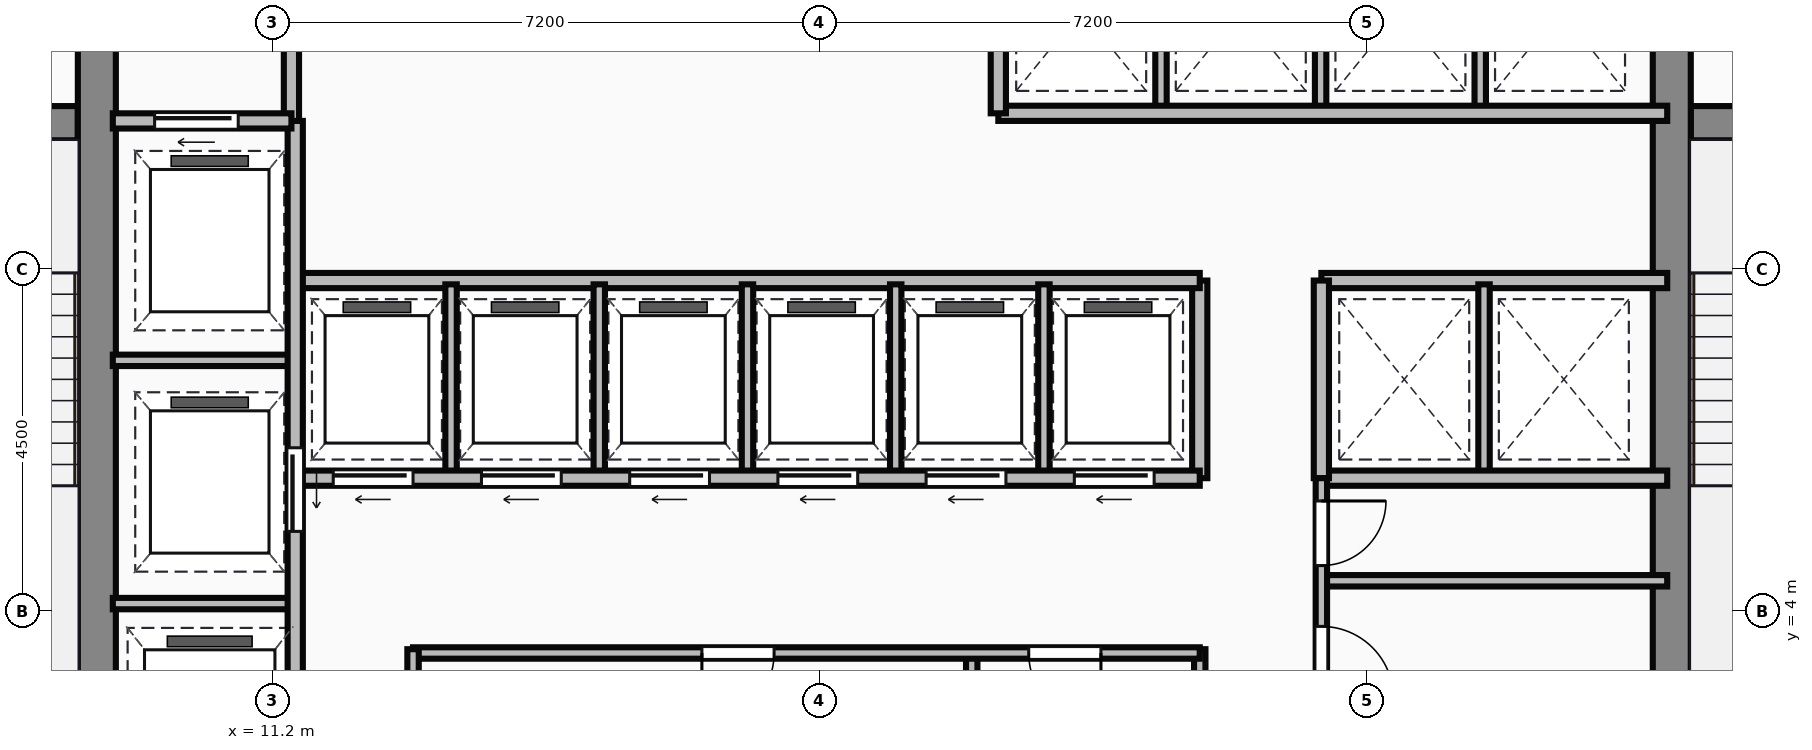
"""IFC4 building model, lengths in metres.
Left out: names, types, materials, properties, quantities, classifications, styles, units other than length and angle.
Written with IfcOpenShell. Run it as: python <this file> out.ifc"""

import sys

from ifc_helpers import new_model, si_unit, direction, frame, frame_2d, origin, place, context, subcontext, project, spatial, rectangle, extrude, source, transform, mapped, element, fill, save


model = new_model("IFC4")
c1 = context("Model", 3, precision=1e-05, world=origin(), true_north=direction((0.0, 1.0)))
c2 = subcontext(c1, "Body", "Model", "MODEL_VIEW")
j1 = project(units=[si_unit("LENGTHUNIT", "METRE"), si_unit("PLANEANGLEUNIT", "RADIAN")], contexts=[c1])
p1 = place(None, origin())
s1 = spatial("IfcSite", under=j1, at=p1, CompositionType="ELEMENT")
p2 = place(p1, origin())
s2 = spatial("IfcBuilding", under=s1, at=p2, CompositionType="ELEMENT")
p3 = place(p2, frame((0.0, 0.0, 92.3)))
s3 = spatial("IfcBuildingStorey", under=s2, at=p3, CompositionType="ELEMENT", Elevation=92.3)
m1 = source(origin(), c2, "Body", "SweptSolid", [
    extrude(rectangle(XDim=12.35, YDim=0.5, at=frame_2d((6.175, 0.0))), origin(), (0.0, 0.0, 1.0), 3.65),
])
for number, where, z_axis, x_axis in (
    (1, (8.89, 0.9, 0.0), (0.0, 0.0, 1.0), (0.0, 1.0, 0.0)),
    (2, (29.61, 0.9, 0.0), (0.0, 0.0, 1.0), (0.0, 1.0, 0.0)),
):
    element("IfcWall", number, at=place(p3, frame(where, z_axis=z_axis, x_axis=x_axis)), inside=s3, PredefinedType="SHEAR", context=c2, shape_type="MappedRepresentation", body=[
        mapped(m1, transform((0.0, 0.0, 0.0))),
    ])
m2 = source(origin(), c2, "Body", "SweptSolid", [
    extrude(rectangle(XDim=3.39, YDim=0.45, at=frame_2d((1.695, 0.0))), origin(), (0.0, 0.0, 1.0), 3.65),
])
p4 = place(p3, frame((5.25, 10.42, 0.0), z_axis=(0.0, 0.0, 1.0), x_axis=(1.0, 0.0, 0.0)))
e3 = element("IfcWall", 3, at=p4, inside=s3, PredefinedType="SHEAR", context=c2, shape_type="MappedRepresentation", body=[
    mapped(m2, transform((0.0, 0.0, 0.0))),
])
p5 = place(p4, frame((1.05, 0.0, 0.0)))
e4 = element("IfcOpeningElement", 4, at=p5, cuts=e3, PredefinedType="OPENING", context=c2, shape_type="SweptSolid", body=[
    extrude(rectangle(XDim=1.1, YDim=2.15, at=frame_2d((0.55, 1.075))), frame((0.0, 0.235, 0.0), z_axis=(0.0, -1.0, 0.0), x_axis=(1.0, 0.0, 0.0)), (0.0, 0.0, 1.0), 0.47),
])
p6 = place(p3, frame((29.86, 10.42, 0.0), z_axis=(0.0, 0.0, 1.0), x_axis=(1.0, 0.0, 0.0)))
e5 = element("IfcWall", 5, at=p6, inside=s3, PredefinedType="SHEAR", context=c2, shape_type="MappedRepresentation", body=[
    mapped(m2, transform((0.0, 0.0, 0.0))),
])
p7 = place(p6, frame((1.1, 0.0, 0.0)))
e6 = element("IfcOpeningElement", 6, at=p7, cuts=e5, PredefinedType="OPENING", context=c2, shape_type="SweptSolid", body=[
    extrude(rectangle(XDim=1.1, YDim=2.15, at=frame_2d((0.55, 1.075))), frame((0.0, 0.235, 0.0), z_axis=(0.0, -1.0, 0.0), x_axis=(1.0, 0.0, 0.0)), (0.0, 0.0, 1.0), 0.47),
])
m3 = source(origin(), c2, "Body", "SweptSolid", [
    extrude(rectangle(XDim=3.18, YDim=0.2, at=frame_2d((1.59, 0.0))), origin(), (0.0, 0.0, 1.0), 3.4),
])
p8 = place(p3, frame((11.45, 10.42, 0.0), z_axis=(0.0, 0.0, 1.0), x_axis=(0.0, 1.0, 0.0)))
e7 = element("IfcWall", 7, at=p8, inside=s3, PredefinedType="PARTITIONING", context=c2, shape_type="MappedRepresentation", body=[
    mapped(m3, transform((0.0, 0.0, 0.0))),
])
m4 = source(origin(), c2, "Body", "SweptSolid", [
    extrude(rectangle(XDim=2.35, YDim=0.2, at=frame_2d((1.175, 0.0))), origin(), (0.0, 0.0, 1.0), 3.4),
])
p9 = place(p3, frame((9.1, 10.45, 0.0), z_axis=(0.0, 0.0, 1.0), x_axis=(1.0, 0.0, 0.0)))
e8 = element("IfcWall", 8, at=p9, inside=s3, PredefinedType="PARTITIONING", context=c2, shape_type="MappedRepresentation", body=[
    mapped(m4, transform((0.0, 0.0, 0.0))),
])
p10 = place(p9, frame((0.55, 0.0, 0.0)))
e9 = element("IfcOpeningElement", 9, at=p10, cuts=e8, PredefinedType="OPENING", context=c2, shape_type="SweptSolid", body=[
    extrude(rectangle(XDim=1.1, YDim=2.15, at=frame_2d((0.55, 1.075))), frame((0.0, 0.11, 0.0), z_axis=(0.0, -1.0, 0.0), x_axis=(1.0, 0.0, 0.0)), (0.0, 0.0, 1.0), 0.22),
])
m5 = source(origin(), c2, "Body", "SweptSolid", [
    extrude(rectangle(XDim=9.6, YDim=0.2, at=frame_2d((4.8, 0.0))), origin(), (0.0, 0.0, 1.0), 3.4),
])
p11 = place(p3, frame((11.5, 0.85, 0.0), z_axis=(0.0, 0.0, 1.0), x_axis=(0.0, 1.0, 0.0)))
e10 = element("IfcWall", 10, at=p11, inside=s3, PredefinedType="PARTITIONING", context=c2, shape_type="MappedRepresentation", body=[
    mapped(m5, transform((0.0, 0.0, 0.0))),
])
p12 = place(p11, frame((4.2, 0.0, 0.0)))
e11 = element("IfcOpeningElement", 11, at=p12, cuts=e10, PredefinedType="OPENING", context=c2, shape_type="SweptSolid", body=[
    extrude(rectangle(XDim=1.1, YDim=2.15, at=frame_2d((0.55, 1.075))), frame((0.0, 0.11, 0.0), z_axis=(0.0, -1.0, 0.0), x_axis=(1.0, 0.0, 0.0)), (0.0, 0.0, 1.0), 0.22),
])
p13 = place(p11, frame((0.9, 0.0, 0.0)))
e12 = element("IfcOpeningElement", 12, at=p13, cuts=e10, PredefinedType="OPENING", context=c2, shape_type="SweptSolid", body=[
    extrude(rectangle(XDim=1.2, YDim=2.15, at=frame_2d((0.6, 1.075))), frame((0.0, 0.11, 0.0), z_axis=(0.0, -1.0, 0.0), x_axis=(1.0, 0.0, 0.0)), (0.0, 0.0, 1.0), 0.22),
])
m6 = source(origin(), c2, "Body", "SweptSolid", [
    extrude(rectangle(XDim=2.4, YDim=0.15, at=frame_2d((1.2, 0.0))), origin(), (0.0, 0.0, 1.0), 3.4),
])
for number, where, z_axis, x_axis in (
    (13, (9.1, 4.1, 0.0), (0.0, 0.0, 1.0), (1.0, 0.0, 0.0)),
    (14, (9.1, 7.3, 0.0), (0.0, 0.0, 1.0), (1.0, 0.0, 0.0)),
):
    element("IfcWall", number, at=place(p3, frame(where, z_axis=z_axis, x_axis=x_axis)), inside=s3, PredefinedType="PARTITIONING", context=c2, shape_type="MappedRepresentation", body=[
        mapped(m6, transform((0.0, 0.0, 0.0))),
    ])
m7 = source(origin(), c2, "Body", "SweptSolid", [
    extrude(rectangle(XDim=2.65, YDim=0.15, at=frame_2d((1.325, 0.0))), origin(), (0.0, 0.0, 1.0), 3.4),
])
p14 = place(p3, frame((13.05, 0.85, 0.0), z_axis=(0.0, 0.0, 1.0), x_axis=(0.0, 1.0, 0.0)))
e15 = element("IfcWall", 15, at=p14, inside=s3, PredefinedType="PARTITIONING", context=c2, shape_type="MappedRepresentation", body=[
    mapped(m7, transform((0.0, 0.0, 0.0))),
])
m8 = source(origin(), c2, "Body", "SweptSolid", [
    extrude(rectangle(XDim=10.35, YDim=0.15, at=frame_2d((5.175, 0.0))), origin(), (0.0, 0.0, 1.0), 3.4),
])
p15 = place(p3, frame((13.05, 3.45, 0.0), z_axis=(0.0, 0.0, 1.0), x_axis=(1.0, 0.0, 0.0)))
e16 = element("IfcWall", 16, at=p15, inside=s3, PredefinedType="PARTITIONING", context=c2, shape_type="MappedRepresentation", body=[
    mapped(m8, transform((0.0, 0.0, 0.0))),
])
p16 = place(p15, frame((3.8, 0.0, 0.0)))
e17 = element("IfcOpeningElement", 17, at=p16, cuts=e16, PredefinedType="OPENING", context=c2, shape_type="SweptSolid", body=[
    extrude(rectangle(XDim=0.95, YDim=2.15, at=frame_2d((0.475, 1.075))), frame((0.0, 0.085, 0.0), z_axis=(0.0, -1.0, 0.0), x_axis=(1.0, 0.0, 0.0)), (0.0, 0.0, 1.0), 0.17),
])
p17 = place(p15, frame((8.1, 0.0, 0.0)))
e18 = element("IfcOpeningElement", 18, at=p17, cuts=e16, PredefinedType="OPENING", context=c2, shape_type="SweptSolid", body=[
    extrude(rectangle(XDim=0.95, YDim=2.15, at=frame_2d((0.475, 1.075))), frame((0.0, 0.085, 0.0), z_axis=(0.0, -1.0, 0.0), x_axis=(1.0, 0.0, 0.0)), (0.0, 0.0, 1.0), 0.17),
])
p18 = place(p3, frame((23.4, 0.85, 0.0), z_axis=(0.0, 0.0, 1.0), x_axis=(0.0, 1.0, 0.0)))
e19 = element("IfcWall", 19, at=p18, inside=s3, PredefinedType="PARTITIONING", context=c2, shape_type="MappedRepresentation", body=[
    mapped(m7, transform((0.0, 0.0, 0.0))),
])
m9 = source(origin(), c2, "Body", "SweptSolid", [
    extrude(rectangle(XDim=2.6, YDim=0.15, at=frame_2d((1.3, 0.0))), origin(), (0.0, 0.0, 1.0), 3.4),
])
p19 = place(p3, frame((20.4, 0.85, 0.0), z_axis=(0.0, 0.0, 1.0), x_axis=(0.0, 1.0, 0.0)))
e20 = element("IfcWall", 20, at=p19, inside=s3, PredefinedType="PARTITIONING", context=c2, shape_type="MappedRepresentation", body=[
    mapped(m9, transform((0.0, 0.0, 0.0))),
])
m10 = source(origin(), c2, "Body", "SweptSolid", [
    extrude(rectangle(XDim=11.85, YDim=0.2, at=frame_2d((5.925, 0.0))), origin(), (0.0, 0.0, 1.0), 3.4),
])
p20 = place(p3, frame((11.55, 5.75, 0.0), z_axis=(0.0, 0.0, 1.0), x_axis=(1.0, 0.0, 0.0)))
e21 = element("IfcWall", 21, at=p20, inside=s3, PredefinedType="PARTITIONING", context=c2, shape_type="MappedRepresentation", body=[
    mapped(m10, transform((0.0, 0.0, 0.0))),
])
p21 = place(p20, frame((0.45, 0.0, 0.0)))
e22 = element("IfcOpeningElement", 22, at=p21, cuts=e21, PredefinedType="OPENING", context=c2, shape_type="SweptSolid", body=[
    extrude(rectangle(XDim=1.05, YDim=2.15, at=frame_2d((0.525, 1.075))), frame((0.0, 0.11, 0.0), z_axis=(0.0, -1.0, 0.0), x_axis=(1.0, 0.0, 0.0)), (0.0, 0.0, 1.0), 0.22),
])
p22 = place(p20, frame((2.4, 0.0, 0.0)))
e23 = element("IfcOpeningElement", 23, at=p22, cuts=e21, PredefinedType="OPENING", context=c2, shape_type="SweptSolid", body=[
    extrude(rectangle(XDim=1.05, YDim=2.15, at=frame_2d((0.525, 1.075))), frame((0.0, 0.11, 0.0), z_axis=(0.0, -1.0, 0.0), x_axis=(1.0, 0.0, 0.0)), (0.0, 0.0, 1.0), 0.22),
])
p23 = place(p20, frame((4.35, 0.0, 0.0)))
e24 = element("IfcOpeningElement", 24, at=p23, cuts=e21, PredefinedType="OPENING", context=c2, shape_type="SweptSolid", body=[
    extrude(rectangle(XDim=1.05, YDim=2.15, at=frame_2d((0.525, 1.075))), frame((0.0, 0.11, 0.0), z_axis=(0.0, -1.0, 0.0), x_axis=(1.0, 0.0, 0.0)), (0.0, 0.0, 1.0), 0.22),
])
p24 = place(p20, frame((6.3, 0.0, 0.0)))
e25 = element("IfcOpeningElement", 25, at=p24, cuts=e21, PredefinedType="OPENING", context=c2, shape_type="SweptSolid", body=[
    extrude(rectangle(XDim=1.05, YDim=2.15, at=frame_2d((0.525, 1.075))), frame((0.0, 0.11, 0.0), z_axis=(0.0, -1.0, 0.0), x_axis=(1.0, 0.0, 0.0)), (0.0, 0.0, 1.0), 0.22),
])
p25 = place(p20, frame((8.25, 0.0, 0.0)))
e26 = element("IfcOpeningElement", 26, at=p25, cuts=e21, PredefinedType="OPENING", context=c2, shape_type="SweptSolid", body=[
    extrude(rectangle(XDim=1.05, YDim=2.15, at=frame_2d((0.525, 1.075))), frame((0.0, 0.11, 0.0), z_axis=(0.0, -1.0, 0.0), x_axis=(1.0, 0.0, 0.0)), (0.0, 0.0, 1.0), 0.22),
])
p26 = place(p20, frame((10.2, 0.0, 0.0)))
e27 = element("IfcOpeningElement", 27, at=p26, cuts=e21, PredefinedType="OPENING", context=c2, shape_type="SweptSolid", body=[
    extrude(rectangle(XDim=1.05, YDim=2.15, at=frame_2d((0.525, 1.075))), frame((0.0, 0.11, 0.0), z_axis=(0.0, -1.0, 0.0), x_axis=(1.0, 0.0, 0.0)), (0.0, 0.0, 1.0), 0.22),
])
p27 = place(p3, frame((11.55, 8.35, 0.0), z_axis=(0.0, 0.0, 1.0), x_axis=(1.0, 0.0, 0.0)))
e28 = element("IfcWall", 28, at=p27, inside=s3, PredefinedType="PARTITIONING", context=c2, shape_type="MappedRepresentation", body=[
    mapped(m10, transform((0.0, 0.0, 0.0))),
])
m11 = source(origin(), c2, "Body", "SweptSolid", [
    extrude(rectangle(XDim=2.6, YDim=0.2, at=frame_2d((1.3, 0.0))), origin(), (0.0, 0.0, 1.0), 3.4),
])
p28 = place(p3, frame((23.4, 5.75, 0.0), z_axis=(0.0, 0.0, 1.0), x_axis=(0.0, 1.0, 0.0)))
e29 = element("IfcWall", 29, at=p28, inside=s3, PredefinedType="PARTITIONING", context=c2, shape_type="MappedRepresentation", body=[
    mapped(m11, transform((0.0, 0.0, 0.0))),
])
m12 = source(origin(), c2, "Body", "SweptSolid", [
    extrude(rectangle(XDim=2.5, YDim=0.15, at=frame_2d((1.25, 0.0))), origin(), (0.0, 0.0, 1.0), 3.4),
])
for number, where, z_axis, x_axis in (
    (30, (13.55, 5.8, 0.0), (0.0, 0.0, 1.0), (0.0, 1.0, 0.0)),
    (31, (15.5, 5.8, 0.0), (0.0, 0.0, 1.0), (0.0, 1.0, 0.0)),
    (32, (17.45, 5.8, 0.0), (0.0, 0.0, 1.0), (0.0, 1.0, 0.0)),
    (33, (19.4, 5.8, 0.0), (0.0, 0.0, 1.0), (0.0, 1.0, 0.0)),
    (34, (21.35, 5.8, 0.0), (0.0, 0.0, 1.0), (0.0, 1.0, 0.0)),
):
    element("IfcWall", number, at=place(p3, frame(where, z_axis=z_axis, x_axis=x_axis)), inside=s3, PredefinedType="PARTITIONING", context=c2, shape_type="MappedRepresentation", body=[
        mapped(m12, transform((0.0, 0.0, 0.0))),
    ])
m13 = source(origin(), c2, "Body", "SweptSolid", [
    extrude(rectangle(XDim=8.8, YDim=0.2, at=frame_2d((4.4, 0.0))), origin(), (0.0, 0.0, 1.0), 3.4),
])
p29 = place(p3, frame((20.75, 10.55, 0.0), z_axis=(0.0, 0.0, 1.0), x_axis=(1.0, 0.0, 0.0)))
e35 = element("IfcWall", 35, at=p29, inside=s3, PredefinedType="PARTITIONING", context=c2, shape_type="MappedRepresentation", body=[
    mapped(m13, transform((0.0, 0.0, 0.0))),
])
m14 = source(origin(), c2, "Body", "SweptSolid", [
    extrude(rectangle(XDim=3.0, YDim=0.2, at=frame_2d((1.5, 0.0))), origin(), (0.0, 0.0, 1.0), 3.4),
])
p30 = place(p3, frame((20.75, 10.55, 0.0), z_axis=(0.0, 0.0, 1.0), x_axis=(0.0, 1.0, 0.0)))
e36 = element("IfcWall", 36, at=p30, inside=s3, PredefinedType="PARTITIONING", context=c2, shape_type="MappedRepresentation", body=[
    mapped(m14, transform((0.0, 0.0, 0.0))),
])
m15 = source(origin(), c2, "Body", "SweptSolid", [
    extrude(rectangle(XDim=2.85, YDim=0.15, at=frame_2d((1.425, 0.0))), origin(), (0.0, 0.0, 1.0), 3.4),
])
for number, where, z_axis, x_axis in (
    (37, (22.89, 10.6, 0.0), (0.0, 0.0, 1.0), (0.0, 1.0, 0.0)),
    (38, (24.99, 10.6, 0.0), (0.0, 0.0, 1.0), (0.0, 1.0, 0.0)),
    (39, (27.09, 10.6, 0.0), (0.0, 0.0, 1.0), (0.0, 1.0, 0.0)),
):
    element("IfcWall", number, at=place(p3, frame(where, z_axis=z_axis, x_axis=x_axis)), inside=s3, PredefinedType="PARTITIONING", context=c2, shape_type="MappedRepresentation", body=[
        mapped(m15, transform((0.0, 0.0, 0.0))),
    ])
m16 = source(origin(), c2, "Body", "SweptSolid", [
    extrude(rectangle(XDim=4.55, YDim=0.2, at=frame_2d((2.275, 0.0))), origin(), (0.0, 0.0, 1.0), 3.4),
])
for number, where, z_axis, x_axis in (
    (40, (25.0, 8.35, 0.0), (0.0, 0.0, 1.0), (1.0, 0.0, 0.0)),
    (41, (25.0, 5.75, 0.0), (0.0, 0.0, 1.0), (1.0, 0.0, 0.0)),
):
    element("IfcWall", number, at=place(p3, frame(where, z_axis=z_axis, x_axis=x_axis)), inside=s3, PredefinedType="PARTITIONING", context=c2, shape_type="MappedRepresentation", body=[
        mapped(m16, transform((0.0, 0.0, 0.0))),
    ])
p31 = place(p3, frame((25.0, 5.75, 0.0), z_axis=(0.0, 0.0, 1.0), x_axis=(0.0, 1.0, 0.0)))
e42 = element("IfcWall", 42, at=p31, inside=s3, PredefinedType="PARTITIONING", context=c2, shape_type="MappedRepresentation", body=[
    mapped(m11, transform((0.0, 0.0, 0.0))),
])
p32 = place(p3, frame((27.14, 5.8, 0.0), z_axis=(0.0, 0.0, 1.0), x_axis=(0.0, 1.0, 0.0)))
e43 = element("IfcWall", 43, at=p32, inside=s3, PredefinedType="PARTITIONING", context=c2, shape_type="MappedRepresentation", body=[
    mapped(m12, transform((0.0, 0.0, 0.0))),
])
m17 = source(origin(), c2, "Body", "SweptSolid", [
    extrude(rectangle(XDim=4.9, YDim=0.15, at=frame_2d((2.45, 0.0))), origin(), (0.0, 0.0, 1.0), 3.4),
])
p33 = place(p3, frame((25.0, 0.85, 0.0), z_axis=(0.0, 0.0, 1.0), x_axis=(0.0, 1.0, 0.0)))
e44 = element("IfcWall", 44, at=p33, inside=s3, PredefinedType="PARTITIONING", context=c2, shape_type="MappedRepresentation", body=[
    mapped(m17, transform((0.0, 0.0, 0.0))),
])
p34 = place(p33, frame((2.0, 0.0, 0.0)))
e45 = element("IfcOpeningElement", 45, at=p34, cuts=e44, PredefinedType="OPENING", context=c2, shape_type="SweptSolid", body=[
    extrude(rectangle(XDim=0.95, YDim=2.15, at=frame_2d((0.475, 1.075))), frame((0.0, 0.085, 0.0), z_axis=(0.0, -1.0, 0.0), x_axis=(1.0, 0.0, 0.0)), (0.0, 0.0, 1.0), 0.17),
])
p35 = place(p33, frame((3.75, 0.0, 0.0)))
e46 = element("IfcOpeningElement", 46, at=p35, cuts=e44, PredefinedType="OPENING", context=c2, shape_type="SweptSolid", body=[
    extrude(rectangle(XDim=0.85, YDim=2.15, at=frame_2d((0.425, 1.075))), frame((0.0, 0.085, 0.0), z_axis=(0.0, -1.0, 0.0), x_axis=(1.0, 0.0, 0.0)), (0.0, 0.0, 1.0), 0.17),
])
m18 = source(origin(), c2, "Body", "SweptSolid", [
    extrude(rectangle(XDim=4.55, YDim=0.15, at=frame_2d((2.275, 0.0))), origin(), (0.0, 0.0, 1.0), 3.4),
])
p36 = place(p3, frame((25.0, 4.4, 0.0), z_axis=(0.0, 0.0, 1.0), x_axis=(1.0, 0.0, 0.0)))
e47 = element("IfcWall", 47, at=p36, inside=s3, PredefinedType="PARTITIONING", context=c2, shape_type="MappedRepresentation", body=[
    mapped(m18, transform((0.0, 0.0, 0.0))),
])
m19 = source(origin(), c2, "Body", "SweptSolid", [
    extrude(rectangle(XDim=1.1, YDim=2.15, at=frame_2d((0.55, 1.075))), frame((0.0, 0.025, 0.0), z_axis=(0.0, -1.0, 0.0), x_axis=(1.0, 0.0, 0.0)), (0.0, 0.0, 1.0), 0.05),
])
p37 = place(p10, origin())
e48 = element("IfcDoor", 48, at=p37, inside=s3, OperationType="SLIDING_TO_LEFT", PredefinedType="DOOR", context=c2, shape_type="MappedRepresentation", body=[
    mapped(m19, transform((0.0, 0.0, 0.0))),
])
fill(e9, e48)
p38 = place(p12, frame((1.1, 0.0, 0.0), z_axis=(0.0, 0.0, 1.0), x_axis=(-1.0, 0.0, 0.0)))
e49 = element("IfcDoor", 49, at=p38, inside=s3, OperationType="SLIDING_TO_LEFT", PredefinedType="DOOR", context=c2, shape_type="MappedRepresentation", body=[
    mapped(m19, transform((0.0, 0.0, 0.0))),
])
fill(e11, e49)
m20 = source(origin(), c2, "Body", "SweptSolid", [
    extrude(rectangle(XDim=0.95, YDim=2.15, at=frame_2d((0.475, 1.075))), frame((0.0, 0.025, 0.0), z_axis=(0.0, -1.0, 0.0), x_axis=(1.0, 0.0, 0.0)), (0.0, 0.0, 1.0), 0.05),
])
p39 = place(p16, origin())
e50 = element("IfcDoor", 50, at=p39, inside=s3, OperationType="SINGLE_SWING_LEFT", PredefinedType="DOOR", context=c2, shape_type="MappedRepresentation", body=[
    mapped(m20, transform((0.0, 0.0, 0.0))),
])
fill(e17, e50)
p40 = place(p17, origin())
e51 = element("IfcDoor", 51, at=p40, inside=s3, OperationType="SINGLE_SWING_RIGHT", PredefinedType="DOOR", context=c2, shape_type="MappedRepresentation", body=[
    mapped(m20, transform((0.0, 0.0, 0.0))),
])
fill(e18, e51)
m21 = source(origin(), c2, "Body", "SweptSolid", [
    extrude(rectangle(XDim=1.05, YDim=2.15, at=frame_2d((0.525, 1.075))), frame((0.0, 0.025, 0.0), z_axis=(0.0, -1.0, 0.0), x_axis=(1.0, 0.0, 0.0)), (0.0, 0.0, 1.0), 0.05),
])
p41 = place(p21, frame((1.05, 0.0, 0.0), z_axis=(0.0, 0.0, 1.0), x_axis=(-1.0, 0.0, 0.0)))
e52 = element("IfcDoor", 52, at=p41, inside=s3, OperationType="SLIDING_TO_LEFT", PredefinedType="DOOR", context=c2, shape_type="MappedRepresentation", body=[
    mapped(m21, transform((0.0, 0.0, 0.0))),
])
fill(e22, e52)
p42 = place(p22, frame((1.05, 0.0, 0.0), z_axis=(0.0, 0.0, 1.0), x_axis=(-1.0, 0.0, 0.0)))
e53 = element("IfcDoor", 53, at=p42, inside=s3, OperationType="SLIDING_TO_LEFT", PredefinedType="DOOR", context=c2, shape_type="MappedRepresentation", body=[
    mapped(m21, transform((0.0, 0.0, 0.0))),
])
fill(e23, e53)
p43 = place(p23, frame((1.05, 0.0, 0.0), z_axis=(0.0, 0.0, 1.0), x_axis=(-1.0, 0.0, 0.0)))
e54 = element("IfcDoor", 54, at=p43, inside=s3, OperationType="SLIDING_TO_LEFT", PredefinedType="DOOR", context=c2, shape_type="MappedRepresentation", body=[
    mapped(m21, transform((0.0, 0.0, 0.0))),
])
fill(e24, e54)
p44 = place(p24, frame((1.05, 0.0, 0.0), z_axis=(0.0, 0.0, 1.0), x_axis=(-1.0, 0.0, 0.0)))
e55 = element("IfcDoor", 55, at=p44, inside=s3, OperationType="SLIDING_TO_LEFT", PredefinedType="DOOR", context=c2, shape_type="MappedRepresentation", body=[
    mapped(m21, transform((0.0, 0.0, 0.0))),
])
fill(e25, e55)
p45 = place(p25, frame((1.05, 0.0, 0.0), z_axis=(0.0, 0.0, 1.0), x_axis=(-1.0, 0.0, 0.0)))
e56 = element("IfcDoor", 56, at=p45, inside=s3, OperationType="SLIDING_TO_LEFT", PredefinedType="DOOR", context=c2, shape_type="MappedRepresentation", body=[
    mapped(m21, transform((0.0, 0.0, 0.0))),
])
fill(e26, e56)
p46 = place(p26, frame((1.05, 0.0, 0.0), z_axis=(0.0, 0.0, 1.0), x_axis=(-1.0, 0.0, 0.0)))
e57 = element("IfcDoor", 57, at=p46, inside=s3, OperationType="SLIDING_TO_LEFT", PredefinedType="DOOR", context=c2, shape_type="MappedRepresentation", body=[
    mapped(m21, transform((0.0, 0.0, 0.0))),
])
fill(e27, e57)
p47 = place(p34, origin())
e58 = element("IfcDoor", 58, at=p47, inside=s3, OperationType="SINGLE_SWING_LEFT", PredefinedType="DOOR", context=c2, shape_type="MappedRepresentation", body=[
    mapped(m20, transform((0.0, 0.0, 0.0))),
])
fill(e45, e58)
m22 = source(origin(), c2, "Body", "SweptSolid", [
    extrude(rectangle(XDim=0.85, YDim=2.15, at=frame_2d((0.425, 1.075))), frame((0.0, 0.025, 0.0), z_axis=(0.0, -1.0, 0.0), x_axis=(1.0, 0.0, 0.0)), (0.0, 0.0, 1.0), 0.05),
])
p48 = place(p35, origin())
e59 = element("IfcDoor", 59, at=p48, inside=s3, OperationType="SINGLE_SWING_RIGHT", PredefinedType="DOOR", context=c2, shape_type="MappedRepresentation", body=[
    mapped(m22, transform((0.0, 0.0, 0.0))),
])
fill(e46, e59)
save(model, sys.argv[1])
